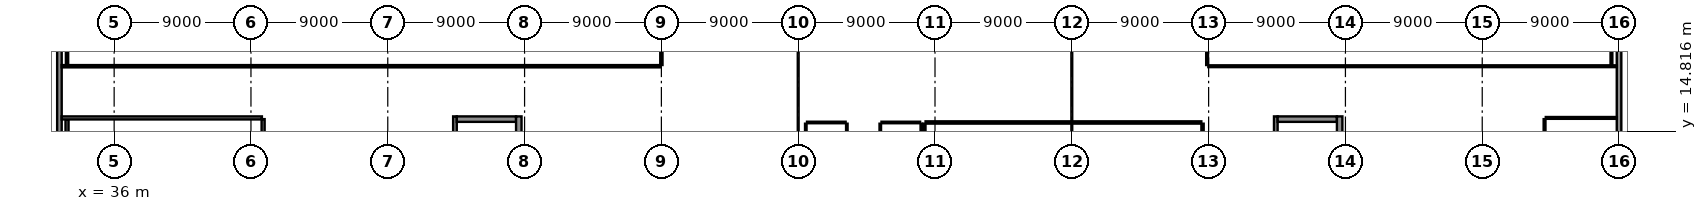
"""IFC4 building model, lengths in metres.
Left out: names, types, materials, properties, quantities, classifications, styles, units other than length and angle.
Written with IfcOpenShell. Run it as: python <this file> out.ifc"""

import sys

from ifc_helpers import new_model, si_unit, direction, frame, frame_2d, origin, place, context, subcontext, project, spatial, rectangle, extrude, element, fill, save


model = new_model("IFC4")
c1 = context("Model", 3, precision=1e-05, world=origin(), true_north=direction((0.0, 1.0)))
c2 = subcontext(c1, "Body", "Model", "MODEL_VIEW")
j1 = project(units=[si_unit("LENGTHUNIT", "METRE"), si_unit("PLANEANGLEUNIT", "RADIAN")], contexts=[c1])
p1 = place(None, origin())
s1 = spatial("IfcSite", under=j1, at=p1, CompositionType="ELEMENT")
p2 = place(p1, origin())
s2 = spatial("IfcBuilding", under=s1, at=p2, CompositionType="ELEMENT")
p3 = place(p2, frame((0.0, 0.0, 9.9)))
s3 = spatial("IfcBuildingStorey", under=s2, at=p3, CompositionType="ELEMENT", Elevation=9.9)
p4 = place(p3, frame((32.4, 23.96, 0.0), z_axis=(0.0, 0.0, 1.0), x_axis=(0.0, -1.0, 0.0)))
e1 = element("IfcWall", 1, at=p4, inside=s3, PredefinedType="SOLIDWALL", context=c2, shape_type="SweptSolid", body=[
    extrude(rectangle(XDim=11.97, YDim=0.3, at=frame_2d((5.985, 0.0))), origin(), (0.0, 0.0, 1.0), 3.455),
])
p5 = place(p4, frame((2.941, 0.0, 0.9)))
e2 = element("IfcOpeningElement", 2, at=p5, cuts=e1, PredefinedType="OPENING", context=c2, shape_type="SweptSolid", body=[
    extrude(rectangle(XDim=1.3, YDim=1.3, at=frame_2d((0.65, 0.65))), frame((0.0, 0.165, 0.0), z_axis=(0.0, -1.0, 0.0), x_axis=(1.0, 0.0, 0.0)), (0.0, 0.0, 1.0), 0.33),
])
p6 = place(p4, frame((8.5, 0.0, 0.9)))
e3 = element("IfcOpeningElement", 3, at=p6, cuts=e1, PredefinedType="OPENING", context=c2, shape_type="SweptSolid", body=[
    extrude(rectangle(XDim=1.3, YDim=1.3, at=frame_2d((0.65, 0.65))), frame((0.0, 0.165, 0.0), z_axis=(0.0, -1.0, 0.0), x_axis=(1.0, 0.0, 0.0)), (0.0, 0.0, 1.0), 0.33),
])
p7 = place(p3, frame((135.0, 12.308, 0.0), z_axis=(0.0, 0.0, 1.0), x_axis=(0.0, 1.0, 0.0)))
e4 = element("IfcWall", 4, at=p7, inside=s3, PredefinedType="SOLIDWALL", context=c2, shape_type="SweptSolid", body=[
    extrude(rectangle(XDim=11.336, YDim=0.3, at=frame_2d((5.668, 0.0))), origin(), (0.0, 0.0, 1.0), 3.825),
])
p8 = place(p7, frame((3.732, 0.0, 0.8)))
e5 = element("IfcOpeningElement", 5, at=p8, cuts=e4, PredefinedType="OPENING", context=c2, shape_type="SweptSolid", body=[
    extrude(rectangle(XDim=2.0, YDim=2.0, at=frame_2d((1.0, 1.0))), frame((0.0, 0.165, 0.0), z_axis=(0.0, -1.0, 0.0), x_axis=(1.0, 0.0, 0.0)), (0.0, 0.0, 1.0), 0.33),
])
p9 = place(p7, frame((7.162, 0.0, 0.8)))
e6 = element("IfcOpeningElement", 6, at=p9, cuts=e4, PredefinedType="OPENING", context=c2, shape_type="SweptSolid", body=[
    extrude(rectangle(XDim=2.0, YDim=2.0, at=frame_2d((1.0, 1.0))), frame((0.0, 0.165, 0.0), z_axis=(0.0, -1.0, 0.0), x_axis=(1.0, 0.0, 0.0)), (0.0, 0.0, 1.0), 0.33),
])
p10 = place(p3, frame((58.42, 13.04, 0.0), z_axis=(0.0, 0.0, 1.0), x_axis=(0.0, 1.0, 0.0)))
e7 = element("IfcWall", 7, at=p10, inside=s3, PredefinedType="SHEAR", context=c2, shape_type="SweptSolid", body=[
    extrude(rectangle(XDim=2.76, YDim=0.24, at=frame_2d((1.38, 0.0))), origin(), (0.0, 0.0, 1.0), 4.16),
])
p11 = place(p3, frame((58.54, 15.62, 0.0), z_axis=(0.0, 0.0, 1.0), x_axis=(1.0, 0.0, 0.0)))
e8 = element("IfcWall", 8, at=p11, inside=s3, PredefinedType="SHEAR", context=c2, shape_type="SweptSolid", body=[
    extrude(rectangle(XDim=3.9, YDim=0.36, at=frame_2d((1.95, 0.0))), origin(), (0.0, 0.0, 1.0), 4.16),
])
p12 = place(p11, frame((1.15, 0.0, 0.0)))
e9 = element("IfcOpeningElement", 9, at=p12, cuts=e8, PredefinedType="OPENING", context=c2, shape_type="SweptSolid", body=[
    extrude(rectangle(XDim=1.6, YDim=2.25, at=frame_2d((0.8, 1.125))), frame((0.0, 0.195, 0.0), z_axis=(0.0, -1.0, 0.0), x_axis=(1.0, 0.0, 0.0)), (0.0, 0.0, 1.0), 0.39),
])
p13 = place(p3, frame((62.62, 6.76, 0.0), z_axis=(0.0, 0.0, 1.0), x_axis=(0.0, 1.0, 0.0)))
e10 = element("IfcWall", 10, at=p13, inside=s3, PredefinedType="SHEAR", context=c2, shape_type="SweptSolid", body=[
    extrude(rectangle(XDim=9.04, YDim=0.36, at=frame_2d((4.52, 0.0))), origin(), (0.0, 0.0, 1.0), 4.16),
])
p14 = place(p3, frame((112.42, 13.04, 0.0), z_axis=(0.0, 0.0, 1.0), x_axis=(0.0, 1.0, 0.0)))
e11 = element("IfcWall", 11, at=p14, inside=s3, PredefinedType="SHEAR", context=c2, shape_type="SweptSolid", body=[
    extrude(rectangle(XDim=2.76, YDim=0.24, at=frame_2d((1.38, 0.0))), origin(), (0.0, 0.0, 1.0), 4.16),
])
p15 = place(p3, frame((112.54, 15.62, 0.0), z_axis=(0.0, 0.0, 1.0), x_axis=(1.0, 0.0, 0.0)))
e12 = element("IfcWall", 12, at=p15, inside=s3, PredefinedType="SHEAR", context=c2, shape_type="SweptSolid", body=[
    extrude(rectangle(XDim=3.9, YDim=0.36, at=frame_2d((1.95, 0.0))), origin(), (0.0, 0.0, 1.0), 4.16),
])
p16 = place(p15, frame((1.15, 0.0, 0.0)))
e13 = element("IfcOpeningElement", 13, at=p16, cuts=e12, PredefinedType="OPENING", context=c2, shape_type="SweptSolid", body=[
    extrude(rectangle(XDim=1.6, YDim=2.25, at=frame_2d((0.8, 1.125))), frame((0.0, 0.195, 0.0), z_axis=(0.0, -1.0, 0.0), x_axis=(1.0, 0.0, 0.0)), (0.0, 0.0, 1.0), 0.39),
])
p17 = place(p3, frame((116.62, 6.76, 0.0), z_axis=(0.0, 0.0, 1.0), x_axis=(0.0, 1.0, 0.0)))
e14 = element("IfcWall", 14, at=p17, inside=s3, PredefinedType="SHEAR", context=c2, shape_type="SweptSolid", body=[
    extrude(rectangle(XDim=9.04, YDim=0.36, at=frame_2d((4.52, 0.0))), origin(), (0.0, 0.0, 1.0), 4.16),
])
p18 = place(p3, frame((32.9, 0.48, 0.0), z_axis=(0.0, 0.0, 1.0), x_axis=(0.0, 1.0, 0.0)))
e15 = element("IfcWall", 15, at=p18, inside=s3, PredefinedType="PARTITIONING", context=c2, shape_type="SweptSolid", body=[
    extrude(rectangle(XDim=15.14, YDim=0.2, at=frame_2d((7.57, 0.0))), origin(), (0.0, 0.0, 1.0), 4.14),
])
p19 = place(p3, frame((32.545, 15.7, 0.0), z_axis=(0.0, 0.0, 1.0), x_axis=(1.0, 0.0, 0.0)))
e16 = element("IfcWall", 16, at=p19, inside=s3, PredefinedType="PARTITIONING", context=c2, shape_type="SweptSolid", body=[
    extrude(rectangle(XDim=13.175, YDim=0.2, at=frame_2d((6.587, 0.0))), origin(), (0.0, 0.0, 1.0), 4.14),
])
p20 = place(p19, frame((5.587, 0.0, 0.0)))
e17 = element("IfcOpeningElement", 17, at=p20, cuts=e16, PredefinedType="OPENING", context=c2, shape_type="SweptSolid", body=[
    extrude(rectangle(XDim=2.0, YDim=2.6, at=frame_2d((1.0, 1.3))), frame((0.0, 0.115, 0.0), z_axis=(0.0, -1.0, 0.0), x_axis=(1.0, 0.0, 0.0)), (0.0, 0.0, 1.0), 0.23),
])
p21 = place(p3, frame((45.8, 15.62, 0.0), z_axis=(0.0, 0.0, 1.0), x_axis=(0.0, -1.0, 0.0)))
e18 = element("IfcWall", 18, at=p21, inside=s3, PredefinedType="PARTITIONING", context=c2, shape_type="SweptSolid", body=[
    extrude(rectangle(XDim=15.14, YDim=0.2, at=frame_2d((7.57, 0.0))), origin(), (0.0, 0.0, 1.0), 4.14),
])
p22 = place(p3, frame((72.0, 23.52, 0.0), z_axis=(0.0, 0.0, 1.0), x_axis=(0.0, -1.0, 0.0)))
e19 = element("IfcWall", 19, at=p22, inside=s3, PredefinedType="PARTITIONING", context=c2, shape_type="SweptSolid", body=[
    extrude(rectangle(XDim=4.34, YDim=0.15, at=frame_2d((2.17, 0.0))), origin(), (0.0, 0.0, 1.0), 3.575),
])
p23 = place(p3, frame((71.92, 19.1, 0.0), z_axis=(0.0, 0.0, 1.0), x_axis=(-1.0, 0.0, 0.0)))
e20 = element("IfcWall", 20, at=p23, inside=s3, PredefinedType="PARTITIONING", context=c2, shape_type="SweptSolid", body=[
    extrude(rectangle(XDim=39.375, YDim=0.15, at=frame_2d((19.688, 0.0))), origin(), (0.0, 0.0, 1.0), 4.14),
])
p24 = place(p23, frame((19.163, 0.0, 0.0)))
e21 = element("IfcOpeningElement", 21, at=p24, cuts=e20, PredefinedType="OPENING", context=c2, shape_type="SweptSolid", body=[
    extrude(rectangle(XDim=1.05, YDim=2.25, at=frame_2d((0.525, 1.125))), frame((0.0, 0.09, 0.0), z_axis=(0.0, -1.0, 0.0), x_axis=(1.0, 0.0, 0.0)), (0.0, 0.0, 1.0), 0.18),
])
p25 = place(p3, frame((32.9, 19.17, 0.0), z_axis=(0.0, 0.0, 1.0), x_axis=(0.0, 1.0, 0.0)))
e22 = element("IfcWall", 22, at=p25, inside=s3, PredefinedType="PARTITIONING", context=c2, shape_type="SweptSolid", body=[
    extrude(rectangle(XDim=4.36, YDim=0.15, at=frame_2d((2.18, 0.0))), origin(), (0.0, 0.0, 1.0), 4.14),
])
p26 = place(p3, frame((134.5, 24.33, 0.0), z_axis=(0.0, 0.0, 1.0), x_axis=(0.0, -1.0, 0.0)))
e23 = element("IfcWall", 23, at=p26, inside=s3, PredefinedType="PARTITIONING", context=c2, shape_type="SweptSolid", body=[
    extrude(rectangle(XDim=5.15, YDim=0.12, at=frame_2d((2.575, 0.0))), origin(), (0.0, 0.0, 1.0), 4.14),
])
p27 = place(p3, frame((134.855, 19.1, 0.0), z_axis=(0.0, 0.0, 1.0), x_axis=(-1.0, 0.0, 0.0)))
e24 = element("IfcWall", 24, at=p27, inside=s3, PredefinedType="PARTITIONING", context=c2, shape_type="SweptSolid", body=[
    extrude(rectangle(XDim=26.875, YDim=0.12, at=frame_2d((13.438, 0.0))), origin(), (0.0, 0.0, 1.0), 4.14),
])
p28 = place(p27, frame((12.988, 0.0, 0.0)))
e25 = element("IfcOpeningElement", 25, at=p28, cuts=e24, PredefinedType="OPENING", context=c2, shape_type="SweptSolid", body=[
    extrude(rectangle(XDim=0.9, YDim=2.1, at=frame_2d((0.45, 1.05))), frame((0.0, 0.075, 0.0), z_axis=(0.0, -1.0, 0.0), x_axis=(1.0, 0.0, 0.0)), (0.0, 0.0, 1.0), 0.15),
])
p29 = place(p3, frame((107.9, 19.18, 0.0), z_axis=(0.0, 0.0, 1.0), x_axis=(0.0, 1.0, 0.0)))
e26 = element("IfcWall", 26, at=p29, inside=s3, PredefinedType="PARTITIONING", context=c2, shape_type="SweptSolid", body=[
    extrude(rectangle(XDim=4.34, YDim=0.12, at=frame_2d((2.17, 0.0))), origin(), (0.0, 0.0, 1.0), 3.685),
])
p30 = place(p3, frame((130.1, 11.68, 0.0), z_axis=(0.0, 0.0, 1.0), x_axis=(0.0, 1.0, 0.0)))
e27 = element("IfcWall", 27, at=p30, inside=s3, PredefinedType="PARTITIONING", context=c2, shape_type="SweptSolid", body=[
    extrude(rectangle(XDim=3.94, YDim=0.12, at=frame_2d((1.97, 0.0))), origin(), (0.0, 0.0, 1.0), 4.14),
])
p31 = place(p3, frame((130.18, 15.7, 0.0), z_axis=(0.0, 0.0, 1.0), x_axis=(1.0, 0.0, 0.0)))
e28 = element("IfcWall", 28, at=p31, inside=s3, PredefinedType="PARTITIONING", context=c2, shape_type="SweptSolid", body=[
    extrude(rectangle(XDim=4.675, YDim=0.12, at=frame_2d((2.337, 0.0))), origin(), (0.0, 0.0, 1.0), 4.14),
])
p32 = place(p31, frame((1.862, 0.0, 0.0)))
e29 = element("IfcOpeningElement", 29, at=p32, cuts=e28, PredefinedType="OPENING", context=c2, shape_type="SweptSolid", body=[
    extrude(rectangle(XDim=0.95, YDim=2.15, at=frame_2d((0.475, 1.075))), frame((0.0, 0.075, 0.0), z_axis=(0.0, -1.0, 0.0), x_axis=(1.0, 0.0, 0.0)), (0.0, 0.0, 1.0), 0.15),
])
p33 = place(p3, frame((81.5, 9.98, 0.0), z_axis=(0.0, 0.0, 1.0), x_axis=(0.0, 1.0, 0.0)))
e30 = element("IfcWall", 30, at=p33, inside=s3, PredefinedType="PARTITIONING", context=c2, shape_type="SweptSolid", body=[
    extrude(rectangle(XDim=5.34, YDim=0.1, at=frame_2d((2.67, 0.0))), origin(), (0.0, 0.0, 1.0), 3.695),
])
p34 = place(p3, frame((81.58, 15.4, 0.0), z_axis=(0.0, 0.0, 1.0), x_axis=(1.0, 0.0, 0.0)))
e31 = element("IfcWall", 31, at=p34, inside=s3, PredefinedType="PARTITIONING", context=c2, shape_type="SweptSolid", body=[
    extrude(rectangle(XDim=2.54, YDim=0.1, at=frame_2d((1.27, 0.0))), origin(), (0.0, 0.0, 1.0), 4.14),
])
p35 = place(p3, frame((84.2, 15.32, 0.0), z_axis=(0.0, 0.0, 1.0), x_axis=(0.0, -1.0, 0.0)))
e32 = element("IfcWall", 32, at=p35, inside=s3, PredefinedType="PARTITIONING", context=c2, shape_type="SweptSolid", body=[
    extrude(rectangle(XDim=5.34, YDim=0.1, at=frame_2d((2.67, 0.0))), origin(), (0.0, 0.0, 1.0), 4.14),
])
p36 = place(p35, frame((2.22, 0.0, 0.0)))
e33 = element("IfcOpeningElement", 33, at=p36, cuts=e32, PredefinedType="OPENING", context=c2, shape_type="SweptSolid", body=[
    extrude(rectangle(XDim=0.9, YDim=2.05, at=frame_2d((0.45, 1.025))), frame((0.0, 0.065, 0.0), z_axis=(0.0, -1.0, 0.0), x_axis=(1.0, 0.0, 0.0)), (0.0, 0.0, 1.0), 0.13),
])
p37 = place(p3, frame((86.4, 9.88, 0.0), z_axis=(0.0, 0.0, 1.0), x_axis=(0.0, 1.0, 0.0)))
e34 = element("IfcWall", 34, at=p37, inside=s3, PredefinedType="PARTITIONING", context=c2, shape_type="SweptSolid", body=[
    extrude(rectangle(XDim=5.44, YDim=0.1, at=frame_2d((2.72, 0.0))), origin(), (0.0, 0.0, 1.0), 4.14),
])
p38 = place(p37, frame((2.22, 0.0, 0.0)))
e35 = element("IfcOpeningElement", 35, at=p38, cuts=e34, PredefinedType="OPENING", context=c2, shape_type="SweptSolid", body=[
    extrude(rectangle(XDim=1.0, YDim=2.1, at=frame_2d((0.5, 1.05))), frame((0.0, 0.065, 0.0), z_axis=(0.0, -1.0, 0.0), x_axis=(1.0, 0.0, 0.0)), (0.0, 0.0, 1.0), 0.13),
])
p39 = place(p3, frame((86.48, 15.4, 0.0), z_axis=(0.0, 0.0, 1.0), x_axis=(1.0, 0.0, 0.0)))
e36 = element("IfcWall", 36, at=p39, inside=s3, PredefinedType="PARTITIONING", context=c2, shape_type="SweptSolid", body=[
    extrude(rectangle(XDim=2.54, YDim=0.1, at=frame_2d((1.27, 0.0))), origin(), (0.0, 0.0, 1.0), 4.14),
])
p40 = place(p3, frame((89.1, 15.32, 0.0), z_axis=(0.0, 0.0, 1.0), x_axis=(0.0, -1.0, 0.0)))
e37 = element("IfcWall", 37, at=p40, inside=s3, PredefinedType="PARTITIONING", context=c2, shape_type="SweptSolid", body=[
    extrude(rectangle(XDim=5.44, YDim=0.1, at=frame_2d((2.72, 0.0))), origin(), (0.0, 0.0, 1.0), 4.14),
])
p41 = place(p3, frame((107.6, 15.32, 0.0), z_axis=(0.0, 0.0, 1.0), x_axis=(0.0, -1.0, 0.0)))
e38 = element("IfcWall", 38, at=p41, inside=s3, PredefinedType="PARTITIONING", context=c2, shape_type="SweptSolid", body=[
    extrude(rectangle(XDim=11.65, YDim=0.15, at=frame_2d((5.825, 0.0))), origin(), (0.0, 0.0, 1.0), 4.14),
])
p42 = place(p3, frame((89.3, 4.27, 0.0), z_axis=(0.0, 0.0, 1.0), x_axis=(0.0, 1.0, 0.0)))
e39 = element("IfcWall", 39, at=p42, inside=s3, PredefinedType="PARTITIONING", context=c2, shape_type="SweptSolid", body=[
    extrude(rectangle(XDim=11.05, YDim=0.15, at=frame_2d((5.525, 0.0))), origin(), (0.0, 0.0, 1.0), 4.14),
])
p43 = place(p3, frame((89.38, 15.4, 0.0), z_axis=(0.0, 0.0, 1.0), x_axis=(1.0, 0.0, 0.0)))
e40 = element("IfcWall", 40, at=p43, inside=s3, PredefinedType="PARTITIONING", context=c2, shape_type="SweptSolid", body=[
    extrude(rectangle(XDim=18.14, YDim=0.15, at=frame_2d((9.07, 0.0))), origin(), (0.0, 0.0, 1.0), 4.14),
])
p44 = place(p43, frame((8.545, 0.0, 0.0)))
e41 = element("IfcOpeningElement", 41, at=p44, cuts=e40, PredefinedType="OPENING", context=c2, shape_type="SweptSolid", body=[
    extrude(rectangle(XDim=1.05, YDim=2.25, at=frame_2d((0.525, 1.125))), frame((0.0, 0.09, 0.0), z_axis=(0.0, -1.0, 0.0), x_axis=(1.0, 0.0, 0.0)), (0.0, 0.0, 1.0), 0.18),
])
p45 = place(p5, origin())
e42 = element("IfcWindow", 42, at=p45, inside=s3, PartitioningType="SINGLE_PANEL", PredefinedType="WINDOW", context=c2, shape_type="SweptSolid", body=[
    extrude(rectangle(XDim=1.3, YDim=1.3, at=frame_2d((0.65, 0.65))), frame((0.0, 0.03, 0.0), z_axis=(0.0, -1.0, 0.0), x_axis=(1.0, 0.0, 0.0)), (0.0, 0.0, 1.0), 0.06),
])
fill(e2, e42)
p46 = place(p6, origin())
e43 = element("IfcWindow", 43, at=p46, inside=s3, PartitioningType="SINGLE_PANEL", PredefinedType="WINDOW", context=c2, shape_type="SweptSolid", body=[
    extrude(rectangle(XDim=1.3, YDim=1.3, at=frame_2d((0.65, 0.65))), frame((0.0, 0.03, 0.0), z_axis=(0.0, -1.0, 0.0), x_axis=(1.0, 0.0, 0.0)), (0.0, 0.0, 1.0), 0.06),
])
fill(e3, e43)
p47 = place(p8, origin())
e44 = element("IfcWindow", 44, at=p47, inside=s3, PartitioningType="SINGLE_PANEL", PredefinedType="WINDOW", context=c2, shape_type="SweptSolid", body=[
    extrude(rectangle(XDim=2.0, YDim=2.0, at=frame_2d((1.0, 1.0))), frame((0.0, 0.03, 0.0), z_axis=(0.0, -1.0, 0.0), x_axis=(1.0, 0.0, 0.0)), (0.0, 0.0, 1.0), 0.06),
])
fill(e5, e44)
p48 = place(p9, origin())
e45 = element("IfcWindow", 45, at=p48, inside=s3, PartitioningType="SINGLE_PANEL", PredefinedType="WINDOW", context=c2, shape_type="SweptSolid", body=[
    extrude(rectangle(XDim=2.0, YDim=2.0, at=frame_2d((1.0, 1.0))), frame((0.0, 0.03, 0.0), z_axis=(0.0, -1.0, 0.0), x_axis=(1.0, 0.0, 0.0)), (0.0, 0.0, 1.0), 0.06),
])
fill(e6, e45)
p49 = place(p12, origin())
e46 = element("IfcDoor", 46, at=p49, inside=s3, OperationType="DOUBLE_DOOR_SINGLE_SWING", PredefinedType="DOOR", context=c2, shape_type="SweptSolid", body=[
    extrude(rectangle(XDim=1.6, YDim=2.25, at=frame_2d((0.8, 1.125))), frame((0.0, 0.025, 0.0), z_axis=(0.0, -1.0, 0.0), x_axis=(1.0, 0.0, 0.0)), (0.0, 0.0, 1.0), 0.05),
])
fill(e9, e46)
p50 = place(p16, origin())
e47 = element("IfcDoor", 47, at=p50, inside=s3, OperationType="DOUBLE_DOOR_SINGLE_SWING", PredefinedType="DOOR", context=c2, shape_type="SweptSolid", body=[
    extrude(rectangle(XDim=1.6, YDim=2.25, at=frame_2d((0.8, 1.125))), frame((0.0, 0.025, 0.0), z_axis=(0.0, -1.0, 0.0), x_axis=(1.0, 0.0, 0.0)), (0.0, 0.0, 1.0), 0.05),
])
fill(e13, e47)
p51 = place(p20, origin())
e48 = element("IfcDoor", 48, at=p51, inside=s3, OperationType="DOUBLE_DOOR_SINGLE_SWING", PredefinedType="DOOR", context=c2, shape_type="SweptSolid", body=[
    extrude(rectangle(XDim=2.0, YDim=2.6, at=frame_2d((1.0, 1.3))), frame((0.0, 0.025, 0.0), z_axis=(0.0, -1.0, 0.0), x_axis=(1.0, 0.0, 0.0)), (0.0, 0.0, 1.0), 0.05),
])
fill(e17, e48)
p52 = place(p24, origin())
e49 = element("IfcDoor", 49, at=p52, inside=s3, OperationType="SINGLE_SWING_LEFT", PredefinedType="DOOR", context=c2, shape_type="SweptSolid", body=[
    extrude(rectangle(XDim=1.05, YDim=2.25, at=frame_2d((0.525, 1.125))), frame((0.0, 0.025, 0.0), z_axis=(0.0, -1.0, 0.0), x_axis=(1.0, 0.0, 0.0)), (0.0, 0.0, 1.0), 0.05),
])
fill(e21, e49)
p53 = place(p28, frame((0.9, 0.0, 0.0), z_axis=(0.0, 0.0, 1.0), x_axis=(-1.0, 0.0, 0.0)))
e50 = element("IfcDoor", 50, at=p53, inside=s3, OperationType="SINGLE_SWING_RIGHT", PredefinedType="DOOR", context=c2, shape_type="SweptSolid", body=[
    extrude(rectangle(XDim=0.9, YDim=2.1, at=frame_2d((0.45, 1.05))), frame((0.0, 0.025, 0.0), z_axis=(0.0, -1.0, 0.0), x_axis=(1.0, 0.0, 0.0)), (0.0, 0.0, 1.0), 0.05),
])
fill(e25, e50)
p54 = place(p32, frame((0.95, 0.0, 0.0), z_axis=(0.0, 0.0, 1.0), x_axis=(-1.0, 0.0, 0.0)))
e51 = element("IfcDoor", 51, at=p54, inside=s3, OperationType="SINGLE_SWING_RIGHT", PredefinedType="DOOR", context=c2, shape_type="SweptSolid", body=[
    extrude(rectangle(XDim=0.95, YDim=2.15, at=frame_2d((0.475, 1.075))), frame((0.0, 0.025, 0.0), z_axis=(0.0, -1.0, 0.0), x_axis=(1.0, 0.0, 0.0)), (0.0, 0.0, 1.0), 0.05),
])
fill(e29, e51)
p55 = place(p44, origin())
e52 = element("IfcDoor", 52, at=p55, inside=s3, OperationType="SINGLE_SWING_LEFT", PredefinedType="DOOR", context=c2, shape_type="SweptSolid", body=[
    extrude(rectangle(XDim=1.05, YDim=2.25, at=frame_2d((0.525, 1.125))), frame((0.0, 0.025, 0.0), z_axis=(0.0, -1.0, 0.0), x_axis=(1.0, 0.0, 0.0)), (0.0, 0.0, 1.0), 0.05),
])
fill(e41, e52)
save(model, sys.argv[1])
